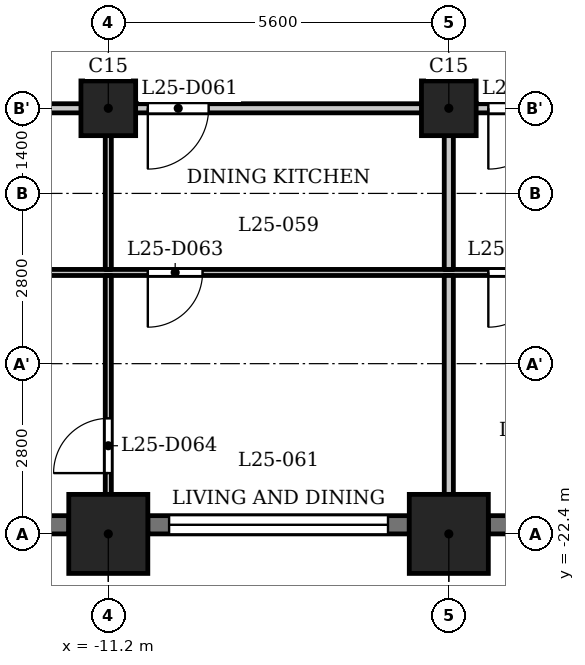
"""IFC4 building model, lengths in metres.
Left out: names, types, materials, properties, quantities, classifications, styles, units other than length and angle.
Written with IfcOpenShell. Run it as: python <this file> out.ifc"""

import sys

from ifc_helpers import new_model, si_unit, direction, frame, frame_2d, origin, origin_2d, place, context, subcontext, project, spatial, rectangle, extrude, element, fill, save


model = new_model("IFC4")
c1 = context("Model", 3, precision=1e-05, world=origin(), true_north=direction((0.0, 1.0)))
c2 = subcontext(c1, "Body", "Model", "MODEL_VIEW")
j1 = project(units=[si_unit("LENGTHUNIT", "METRE"), si_unit("PLANEANGLEUNIT", "RADIAN")], contexts=[c1])
p1 = place(None, origin())
s1 = spatial("IfcSite", under=j1, at=p1, CompositionType="ELEMENT")
p2 = place(p1, origin())
s2 = spatial("IfcBuilding", under=s1, at=p2, CompositionType="ELEMENT")
p3 = place(p2, frame((0.0, 0.0, 100.8)))
s3 = spatial("IfcBuildingStorey", under=s2, at=p3, CompositionType="ELEMENT", Elevation=100.8)
for number, where, z_axis, x_axis in (
    (1, (-11.2, -22.4, 0.0), (0.0, 0.0, 1.0), (1.0, 0.0, 0.0)),
    (2, (-5.6, -22.4, 0.0), (0.0, 0.0, 1.0), (1.0, 0.0, 0.0)),
):
    element("IfcColumn", number, at=place(p3, frame(where, z_axis=z_axis, x_axis=x_axis)), inside=s3, PredefinedType="COLUMN", context=c2, shape_type="SweptSolid", body=[
        extrude(rectangle(XDim=1.3, YDim=1.3, at=origin_2d()), origin(), (0.0, 0.0, 1.0), 3.5),
    ])
for number, where, z_axis, x_axis in (
    (3, (-11.2, -15.4, 0.0), (0.0, 0.0, 1.0), (1.0, 0.0, 0.0)),
    (4, (-5.6, -15.4, 0.0), (0.0, 0.0, 1.0), (1.0, 0.0, 0.0)),
):
    element("IfcColumn", number, at=place(p3, frame(where, z_axis=z_axis, x_axis=x_axis)), inside=s3, PredefinedType="COLUMN", context=c2, shape_type="SweptSolid", body=[
        extrude(rectangle(XDim=0.9, YDim=0.9, at=origin_2d()), origin(), (0.0, 0.0, 1.0), 3.5),
    ])
p4 = place(p3, frame((-16.15, -22.25, 0.0), z_axis=(0.0, 0.0, 1.0), x_axis=(1.0, 0.0, 0.0)))
e5 = element("IfcWall", 5, at=p4, inside=s3, PredefinedType="SOLIDWALL", context=c2, shape_type="SweptSolid", body=[
    extrude(rectangle(XDim=4.3, YDim=0.3, at=frame_2d((2.15, 0.0))), origin(), (0.0, 0.0, 1.0), 2.4),
])
p5 = place(p4, frame((0.35, 0.0, 1.2)))
e6 = element("IfcOpeningElement", 6, at=p5, cuts=e5, PredefinedType="OPENING", context=c2, shape_type="SweptSolid", body=[
    extrude(rectangle(XDim=3.6, YDim=0.95, at=frame_2d((1.8, 0.475))), frame((0.0, 0.16, 0.0), z_axis=(0.0, -1.0, 0.0), x_axis=(1.0, 0.0, 0.0)), (0.0, 0.0, 1.0), 0.32),
])
p6 = place(p3, frame((-10.55, -22.25, 0.0), z_axis=(0.0, 0.0, 1.0), x_axis=(1.0, 0.0, 0.0)))
e7 = element("IfcWall", 7, at=p6, inside=s3, PredefinedType="SOLIDWALL", context=c2, shape_type="SweptSolid", body=[
    extrude(rectangle(XDim=4.3, YDim=0.3, at=frame_2d((2.15, 0.0))), origin(), (0.0, 0.0, 1.0), 2.4),
])
p7 = place(p6, frame((0.35, 0.0, 1.2)))
e8 = element("IfcOpeningElement", 8, at=p7, cuts=e7, PredefinedType="OPENING", context=c2, shape_type="SweptSolid", body=[
    extrude(rectangle(XDim=3.6, YDim=0.95, at=frame_2d((1.8, 0.475))), frame((0.0, 0.16, 0.0), z_axis=(0.0, -1.0, 0.0), x_axis=(1.0, 0.0, 0.0)), (0.0, 0.0, 1.0), 0.32),
])
p8 = place(p3, frame((-4.95, -22.25, 0.0), z_axis=(0.0, 0.0, 1.0), x_axis=(1.0, 0.0, 0.0)))
e9 = element("IfcWall", 9, at=p8, inside=s3, PredefinedType="SOLIDWALL", context=c2, shape_type="SweptSolid", body=[
    extrude(rectangle(XDim=4.3, YDim=0.3, at=frame_2d((2.15, 0.0))), origin(), (0.0, 0.0, 1.0), 2.4),
])
p9 = place(p8, frame((0.35, 0.0, 1.2)))
e10 = element("IfcOpeningElement", 10, at=p9, cuts=e9, PredefinedType="OPENING", context=c2, shape_type="SweptSolid", body=[
    extrude(rectangle(XDim=3.6, YDim=0.95, at=frame_2d((1.8, 0.475))), frame((0.0, 0.16, 0.0), z_axis=(0.0, -1.0, 0.0), x_axis=(1.0, 0.0, 0.0)), (0.0, 0.0, 1.0), 0.32),
])
p10 = place(p3, frame((-26.19, -18.1, 0.0), z_axis=(0.0, 0.0, 1.0), x_axis=(1.0, 0.0, 0.0)))
e11 = element("IfcWall", 11, at=p10, inside=s3, PredefinedType="PARTITIONING", context=c2, shape_type="SweptSolid", body=[
    extrude(rectangle(XDim=52.63, YDim=0.1, at=frame_2d((26.315, 0.0))), origin(), (0.0, 0.0, 1.0), 3.2),
])
p11 = place(p10, frame((1.09, 0.0, 0.0)))
e12 = element("IfcOpeningElement", 12, at=p11, cuts=e11, PredefinedType="OPENING", context=c2, shape_type="SweptSolid", body=[
    extrude(rectangle(XDim=0.8, YDim=2.1, at=frame_2d((0.4, 1.05))), frame((0.0, 0.06, 0.0), z_axis=(0.0, -1.0, 0.0), x_axis=(1.0, 0.0, 0.0)), (0.0, 0.0, 1.0), 0.12),
])
p12 = place(p10, frame((4.44, 0.0, 0.0)))
e13 = element("IfcOpeningElement", 13, at=p12, cuts=e11, PredefinedType="OPENING", context=c2, shape_type="SweptSolid", body=[
    extrude(rectangle(XDim=0.9, YDim=2.1, at=frame_2d((0.45, 1.05))), frame((0.0, 0.06, 0.0), z_axis=(0.0, -1.0, 0.0), x_axis=(1.0, 0.0, 0.0)), (0.0, 0.0, 1.0), 0.12),
])
p13 = place(p10, frame((10.04, 0.0, 0.0)))
e14 = element("IfcOpeningElement", 14, at=p13, cuts=e11, PredefinedType="OPENING", context=c2, shape_type="SweptSolid", body=[
    extrude(rectangle(XDim=0.8, YDim=2.1, at=frame_2d((0.4, 1.05))), frame((0.0, 0.06, 0.0), z_axis=(0.0, -1.0, 0.0), x_axis=(1.0, 0.0, 0.0)), (0.0, 0.0, 1.0), 0.12),
])
p14 = place(p10, frame((15.64, 0.0, 0.0)))
e15 = element("IfcOpeningElement", 15, at=p14, cuts=e11, PredefinedType="OPENING", context=c2, shape_type="SweptSolid", body=[
    extrude(rectangle(XDim=0.9, YDim=2.1, at=frame_2d((0.45, 1.05))), frame((0.0, 0.06, 0.0), z_axis=(0.0, -1.0, 0.0), x_axis=(1.0, 0.0, 0.0)), (0.0, 0.0, 1.0), 0.12),
])
p15 = place(p10, frame((24.74, 0.0, 0.0)))
e16 = element("IfcOpeningElement", 16, at=p15, cuts=e11, PredefinedType="OPENING", context=c2, shape_type="SweptSolid", body=[
    extrude(rectangle(XDim=0.8, YDim=2.1, at=frame_2d((0.4, 1.05))), frame((0.0, 0.06, 0.0), z_axis=(0.0, -1.0, 0.0), x_axis=(1.0, 0.0, 0.0)), (0.0, 0.0, 1.0), 0.12),
])
p16 = place(p10, frame((21.24, 0.0, 0.0)))
e17 = element("IfcOpeningElement", 17, at=p16, cuts=e11, PredefinedType="OPENING", context=c2, shape_type="SweptSolid", body=[
    extrude(rectangle(XDim=0.9, YDim=2.1, at=frame_2d((0.45, 1.05))), frame((0.0, 0.06, 0.0), z_axis=(0.0, -1.0, 0.0), x_axis=(1.0, 0.0, 0.0)), (0.0, 0.0, 1.0), 0.12),
])
p17 = place(p10, frame((35.94, 0.0, 0.0)))
e18 = element("IfcOpeningElement", 18, at=p17, cuts=e11, PredefinedType="OPENING", context=c2, shape_type="SweptSolid", body=[
    extrude(rectangle(XDim=0.8, YDim=2.1, at=frame_2d((0.4, 1.05))), frame((0.0, 0.06, 0.0), z_axis=(0.0, -1.0, 0.0), x_axis=(1.0, 0.0, 0.0)), (0.0, 0.0, 1.0), 0.12),
])
p18 = place(p10, frame((33.19, 0.0, 0.0)))
e19 = element("IfcOpeningElement", 19, at=p18, cuts=e11, PredefinedType="OPENING", context=c2, shape_type="SweptSolid", body=[
    extrude(rectangle(XDim=0.9, YDim=2.1, at=frame_2d((0.45, 1.05))), frame((0.0, 0.06, 0.0), z_axis=(0.0, -1.0, 0.0), x_axis=(1.0, 0.0, 0.0)), (0.0, 0.0, 1.0), 0.12),
])
p19 = place(p10, frame((27.59, 0.0, 0.0)))
e20 = element("IfcOpeningElement", 20, at=p19, cuts=e11, PredefinedType="OPENING", context=c2, shape_type="SweptSolid", body=[
    extrude(rectangle(XDim=0.9, YDim=2.1, at=frame_2d((0.45, 1.05))), frame((0.0, 0.06, 0.0), z_axis=(0.0, -1.0, 0.0), x_axis=(1.0, 0.0, 0.0)), (0.0, 0.0, 1.0), 0.12),
])
p20 = place(p10, frame((29.64, 0.0, 0.0)))
e21 = element("IfcOpeningElement", 21, at=p20, cuts=e11, PredefinedType="OPENING", context=c2, shape_type="SweptSolid", body=[
    extrude(rectangle(XDim=0.9, YDim=2.1, at=frame_2d((0.45, 1.05))), frame((0.0, 0.06, 0.0), z_axis=(0.0, -1.0, 0.0), x_axis=(1.0, 0.0, 0.0)), (0.0, 0.0, 1.0), 0.12),
])
p21 = place(p10, frame((41.54, 0.0, 0.0)))
e22 = element("IfcOpeningElement", 22, at=p21, cuts=e11, PredefinedType="OPENING", context=c2, shape_type="SweptSolid", body=[
    extrude(rectangle(XDim=0.8, YDim=2.1, at=frame_2d((0.4, 1.05))), frame((0.0, 0.06, 0.0), z_axis=(0.0, -1.0, 0.0), x_axis=(1.0, 0.0, 0.0)), (0.0, 0.0, 1.0), 0.12),
])
p22 = place(p10, frame((38.54, 0.0, 0.0)))
e23 = element("IfcOpeningElement", 23, at=p22, cuts=e11, PredefinedType="OPENING", context=c2, shape_type="SweptSolid", body=[
    extrude(rectangle(XDim=0.9, YDim=2.1, at=frame_2d((0.45, 1.05))), frame((0.0, 0.06, 0.0), z_axis=(0.0, -1.0, 0.0), x_axis=(1.0, 0.0, 0.0)), (0.0, 0.0, 1.0), 0.12),
])
p23 = place(p10, frame((49.204, 0.0, 0.0)))
e24 = element("IfcOpeningElement", 24, at=p23, cuts=e11, PredefinedType="OPENING", context=c2, shape_type="SweptSolid", body=[
    extrude(rectangle(XDim=0.8, YDim=2.1, at=frame_2d((0.4, 1.05))), frame((0.0, 0.06, 0.0), z_axis=(0.0, -1.0, 0.0), x_axis=(1.0, 0.0, 0.0)), (0.0, 0.0, 1.0), 0.12),
])
p24 = place(p10, frame((43.64, 0.0, 0.0)))
e25 = element("IfcOpeningElement", 25, at=p24, cuts=e11, PredefinedType="OPENING", context=c2, shape_type="SweptSolid", body=[
    extrude(rectangle(XDim=0.9, YDim=2.1, at=frame_2d((0.45, 1.05))), frame((0.0, 0.06, 0.0), z_axis=(0.0, -1.0, 0.0), x_axis=(1.0, 0.0, 0.0)), (0.0, 0.0, 1.0), 0.12),
])
p25 = place(p3, frame((-27.484, -15.4, 0.0), z_axis=(0.0, 0.0, 1.0), x_axis=(1.0, 0.0, 0.0)))
e26 = element("IfcWall", 26, at=p25, inside=s3, PredefinedType="PARTITIONING", context=c2, shape_type="SweptSolid", body=[
    extrude(rectangle(XDim=54.968, YDim=0.15, at=frame_2d((27.484, 0.0))), origin(), (0.0, 0.0, 1.0), 3.2),
])
p26 = place(p25, frame((5.734, 0.0, 0.0)))
e27 = element("IfcOpeningElement", 27, at=p26, cuts=e26, PredefinedType="OPENING", context=c2, shape_type="SweptSolid", body=[
    extrude(rectangle(XDim=1.0, YDim=2.1, at=frame_2d((0.5, 1.05))), frame((0.0, 0.085, 0.0), z_axis=(0.0, -1.0, 0.0), x_axis=(1.0, 0.0, 0.0)), (0.0, 0.0, 1.0), 0.17),
])
p27 = place(p25, frame((16.934, 0.0, 0.0)))
e28 = element("IfcOpeningElement", 28, at=p27, cuts=e26, PredefinedType="OPENING", context=c2, shape_type="SweptSolid", body=[
    extrude(rectangle(XDim=1.0, YDim=2.1, at=frame_2d((0.5, 1.05))), frame((0.0, 0.085, 0.0), z_axis=(0.0, -1.0, 0.0), x_axis=(1.0, 0.0, 0.0)), (0.0, 0.0, 1.0), 0.17),
])
p28 = place(p25, frame((22.534, 0.0, 0.0)))
e29 = element("IfcOpeningElement", 29, at=p28, cuts=e26, PredefinedType="OPENING", context=c2, shape_type="SweptSolid", body=[
    extrude(rectangle(XDim=1.0, YDim=2.1, at=frame_2d((0.5, 1.05))), frame((0.0, 0.085, 0.0), z_axis=(0.0, -1.0, 0.0), x_axis=(1.0, 0.0, 0.0)), (0.0, 0.0, 1.0), 0.17),
])
p29 = place(p25, frame((31.384, 0.0, 0.0)))
e30 = element("IfcOpeningElement", 30, at=p29, cuts=e26, PredefinedType="OPENING", context=c2, shape_type="SweptSolid", body=[
    extrude(rectangle(XDim=1.0, YDim=2.1, at=frame_2d((0.5, 1.05))), frame((0.0, 0.085, 0.0), z_axis=(0.0, -1.0, 0.0), x_axis=(1.0, 0.0, 0.0)), (0.0, 0.0, 1.0), 0.17),
])
p30 = place(p25, frame((39.584, 0.0, 0.0)))
e31 = element("IfcOpeningElement", 31, at=p30, cuts=e26, PredefinedType="OPENING", context=c2, shape_type="SweptSolid", body=[
    extrude(rectangle(XDim=1.0, YDim=2.1, at=frame_2d((0.5, 1.05))), frame((0.0, 0.085, 0.0), z_axis=(0.0, -1.0, 0.0), x_axis=(1.0, 0.0, 0.0)), (0.0, 0.0, 1.0), 0.17),
])
p31 = place(p25, frame((44.934, 0.0, 0.0)))
e32 = element("IfcOpeningElement", 32, at=p31, cuts=e26, PredefinedType="OPENING", context=c2, shape_type="SweptSolid", body=[
    extrude(rectangle(XDim=1.0, YDim=2.1, at=frame_2d((0.5, 1.05))), frame((0.0, 0.085, 0.0), z_axis=(0.0, -1.0, 0.0), x_axis=(1.0, 0.0, 0.0)), (0.0, 0.0, 1.0), 0.17),
])
p32 = place(p3, frame((-11.2, -23.03, 0.0), z_axis=(0.0, 0.0, 1.0), x_axis=(0.0, 1.0, 0.0)))
e33 = element("IfcWall", 33, at=p32, inside=s3, PredefinedType="PARTITIONING", context=c2, shape_type="SweptSolid", body=[
    extrude(rectangle(XDim=4.88, YDim=0.1, at=frame_2d((2.44, 0.0))), origin(), (0.0, 0.0, 1.0), 3.2),
])
p33 = place(p32, frame((1.63, 0.0, 0.0)))
e34 = element("IfcOpeningElement", 34, at=p33, cuts=e33, PredefinedType="OPENING", context=c2, shape_type="SweptSolid", body=[
    extrude(rectangle(XDim=0.9, YDim=2.1, at=frame_2d((0.45, 1.05))), frame((0.0, 0.06, 0.0), z_axis=(0.0, -1.0, 0.0), x_axis=(1.0, 0.0, 0.0)), (0.0, 0.0, 1.0), 0.12),
])
p34 = place(p3, frame((-11.2, -18.05, 0.0), z_axis=(0.0, 0.0, 1.0), x_axis=(0.0, 1.0, 0.0)))
e35 = element("IfcWall", 35, at=p34, inside=s3, PredefinedType="PARTITIONING", context=c2, shape_type="SweptSolid", body=[
    extrude(rectangle(XDim=2.575, YDim=0.1, at=frame_2d((1.288, 0.0))), origin(), (0.0, 0.0, 1.0), 3.2),
])
p35 = place(p3, frame((-5.6, -23.03, 0.0), z_axis=(0.0, 0.0, 1.0), x_axis=(0.0, 1.0, 0.0)))
e36 = element("IfcWall", 36, at=p35, inside=s3, PredefinedType="PARTITIONING", context=c2, shape_type="SweptSolid", body=[
    extrude(rectangle(XDim=4.88, YDim=0.15, at=frame_2d((2.44, 0.0))), origin(), (0.0, 0.0, 1.0), 3.2),
])
p36 = place(p3, frame((-5.6, -18.05, 0.0), z_axis=(0.0, 0.0, 1.0), x_axis=(0.0, 1.0, 0.0)))
e37 = element("IfcWall", 37, at=p36, inside=s3, PredefinedType="PARTITIONING", context=c2, shape_type="SweptSolid", body=[
    extrude(rectangle(XDim=2.575, YDim=0.15, at=frame_2d((1.288, 0.0))), origin(), (0.0, 0.0, 1.0), 3.2),
])
p37 = place(p27, origin())
e38 = element("IfcDoor", 38, at=p37, inside=s3, OperationType="SINGLE_SWING_LEFT", PredefinedType="DOOR", context=c2, shape_type="SweptSolid", body=[
    extrude(rectangle(XDim=1.0, YDim=2.1, at=frame_2d((0.5, 1.05))), frame((0.0, 0.025, 0.0), z_axis=(0.0, -1.0, 0.0), x_axis=(1.0, 0.0, 0.0)), (0.0, 0.0, 1.0), 0.05),
])
fill(e28, e38)
p38 = place(p14, origin())
e39 = element("IfcDoor", 39, at=p38, inside=s3, OperationType="SINGLE_SWING_LEFT", PredefinedType="DOOR", context=c2, shape_type="SweptSolid", body=[
    extrude(rectangle(XDim=0.9, YDim=2.1, at=frame_2d((0.45, 1.05))), frame((0.0, 0.025, 0.0), z_axis=(0.0, -1.0, 0.0), x_axis=(1.0, 0.0, 0.0)), (0.0, 0.0, 1.0), 0.05),
])
fill(e15, e39)
p39 = place(p33, origin())
e40 = element("IfcDoor", 40, at=p39, inside=s3, OperationType="SINGLE_SWING_RIGHT", PredefinedType="DOOR", context=c2, shape_type="SweptSolid", body=[
    extrude(rectangle(XDim=0.9, YDim=2.1, at=frame_2d((0.45, 1.05))), frame((0.0, 0.025, 0.0), z_axis=(0.0, -1.0, 0.0), x_axis=(1.0, 0.0, 0.0)), (0.0, 0.0, 1.0), 0.05),
])
fill(e34, e40)
p40 = place(p28, origin())
e41 = element("IfcDoor", 41, at=p40, inside=s3, OperationType="SINGLE_SWING_LEFT", PredefinedType="DOOR", context=c2, shape_type="SweptSolid", body=[
    extrude(rectangle(XDim=1.0, YDim=2.1, at=frame_2d((0.5, 1.05))), frame((0.0, 0.025, 0.0), z_axis=(0.0, -1.0, 0.0), x_axis=(1.0, 0.0, 0.0)), (0.0, 0.0, 1.0), 0.05),
])
fill(e29, e41)
p41 = place(p16, origin())
e42 = element("IfcDoor", 42, at=p41, inside=s3, OperationType="SINGLE_SWING_LEFT", PredefinedType="DOOR", context=c2, shape_type="SweptSolid", body=[
    extrude(rectangle(XDim=0.9, YDim=2.1, at=frame_2d((0.45, 1.05))), frame((0.0, 0.025, 0.0), z_axis=(0.0, -1.0, 0.0), x_axis=(1.0, 0.0, 0.0)), (0.0, 0.0, 1.0), 0.05),
])
fill(e17, e42)
p42 = place(p7, origin())
e43 = element("IfcWindow", 43, at=p42, inside=s3, PartitioningType="SINGLE_PANEL", PredefinedType="WINDOW", context=c2, shape_type="SweptSolid", body=[
    extrude(rectangle(XDim=3.6, YDim=0.95, at=frame_2d((1.8, 0.475))), frame((0.0, 0.03, 0.0), z_axis=(0.0, -1.0, 0.0), x_axis=(1.0, 0.0, 0.0)), (0.0, 0.0, 1.0), 0.06),
])
fill(e8, e43)
save(model, sys.argv[1])
